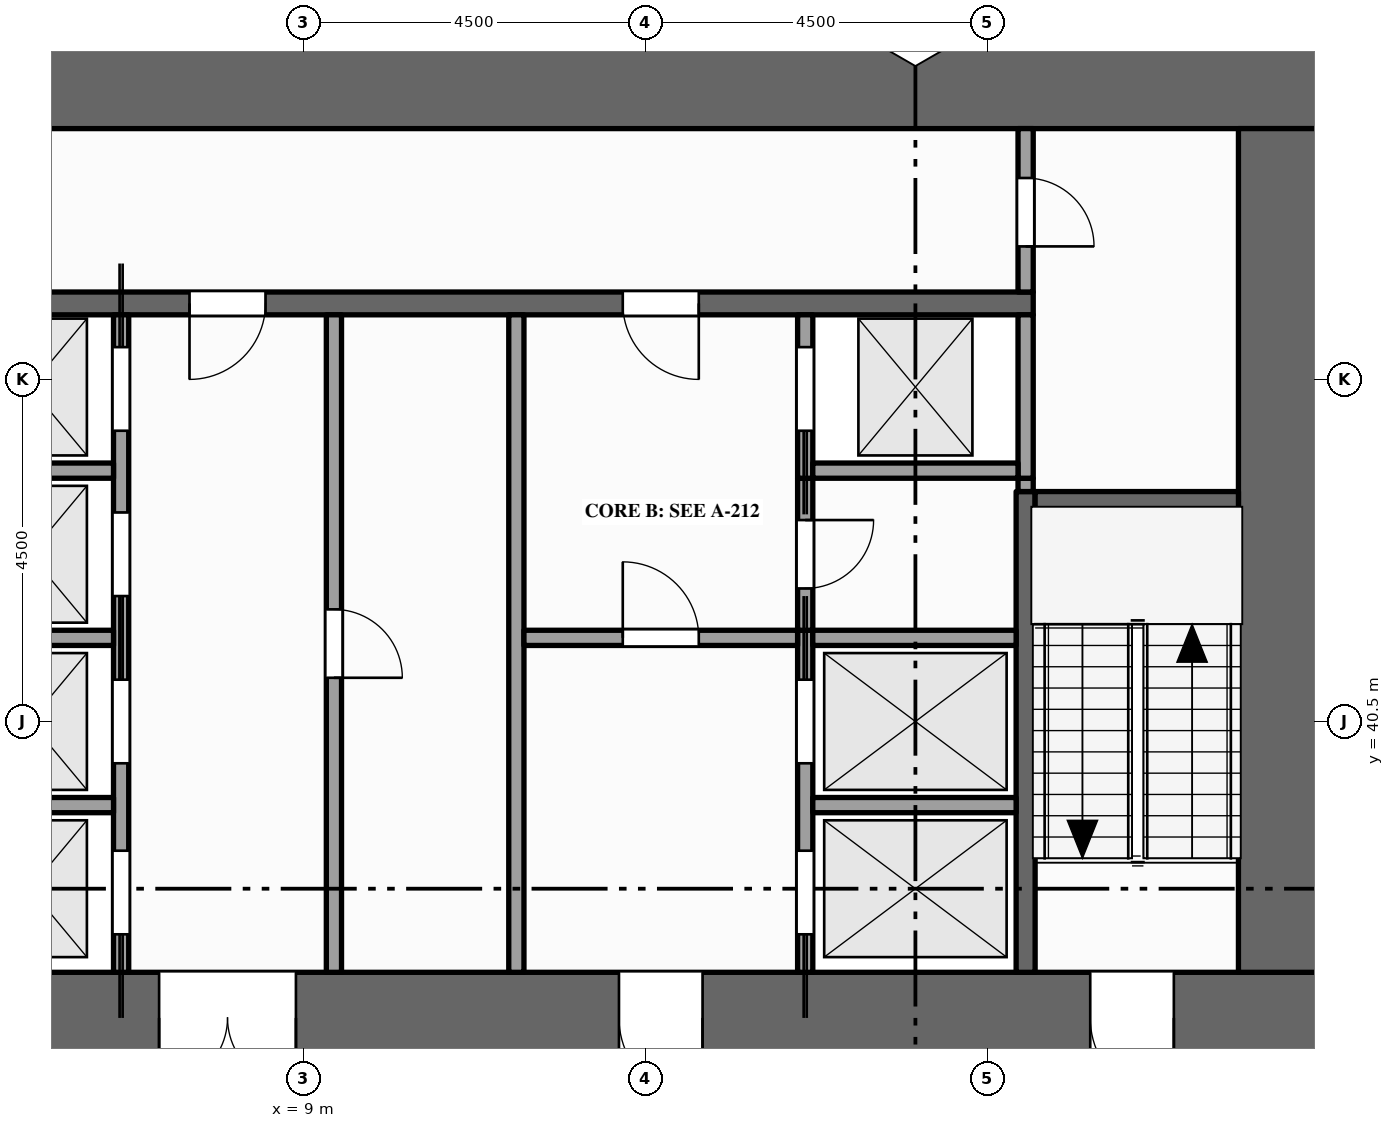
"""IFC4 building model, lengths in metres.
Left out: names, types, materials, properties, quantities, classifications, styles, units other than length and angle.
Written with IfcOpenShell. Run it as: python <this file> out.ifc"""

import sys

from ifc_helpers import new_model, si_unit, direction, frame, frame_2d, origin, place, context, subcontext, project, spatial, rectangle, extrude, element, fill, save


model = new_model("IFC4")
c1 = context("Model", 3, precision=1e-05, world=origin(), true_north=direction((0.0, 1.0)))
c2 = subcontext(c1, "Body", "Model", "MODEL_VIEW")
j1 = project(units=[si_unit("LENGTHUNIT", "METRE"), si_unit("PLANEANGLEUNIT", "RADIAN")], contexts=[c1])
p1 = place(None, origin())
s1 = spatial("IfcSite", under=j1, at=p1, CompositionType="ELEMENT")
p2 = place(p1, origin())
s2 = spatial("IfcBuilding", under=s1, at=p2, CompositionType="ELEMENT")
p3 = place(p2, frame((0.0, 0.0, 61.0)))
s3 = spatial("IfcBuildingStorey", under=s2, at=p3, CompositionType="ELEMENT", Elevation=61.0)
p4 = place(p3, frame((0.0, 36.6, -0.15), z_axis=(0.0, 0.0, 1.0), x_axis=(1.0, 0.0, 0.0)))
e1 = element("IfcWall", 1, at=p4, inside=s3, PredefinedType="SHEAR", context=c2, shape_type="SweptSolid", body=[
    extrude(rectangle(XDim=22.5, YDim=1.2, at=frame_2d((11.25, 0.0))), origin(), (0.0, 0.0, 1.0), 4.0),
])
p5 = place(p4, frame((7.1, 0.0, 0.15)))
e2 = element("IfcOpeningElement", 2, at=p5, cuts=e1, PredefinedType="OPENING", context=c2, shape_type="SweptSolid", body=[
    extrude(rectangle(XDim=1.8, YDim=2.1, at=frame_2d((0.9, 1.05))), frame((0.0, 0.61, 0.0), z_axis=(0.0, -1.0, 0.0), x_axis=(1.0, 0.0, 0.0)), (0.0, 0.0, 1.0), 1.22),
])
p6 = place(p4, frame((13.15, 0.0, 0.15)))
e3 = element("IfcOpeningElement", 3, at=p6, cuts=e1, PredefinedType="OPENING", context=c2, shape_type="SweptSolid", body=[
    extrude(rectangle(XDim=1.1, YDim=2.1, at=frame_2d((0.55, 1.05))), frame((0.0, 0.61, 0.0), z_axis=(0.0, -1.0, 0.0), x_axis=(1.0, 0.0, 0.0)), (0.0, 0.0, 1.0), 1.22),
])
p7 = place(p4, frame((2.15, 0.0, 0.15)))
e4 = element("IfcOpeningElement", 4, at=p7, cuts=e1, PredefinedType="OPENING", context=c2, shape_type="SweptSolid", body=[
    extrude(rectangle(XDim=1.1, YDim=2.1, at=frame_2d((0.55, 1.05))), frame((0.0, 0.61, 0.0), z_axis=(0.0, -1.0, 0.0), x_axis=(1.0, 0.0, 0.0)), (0.0, 0.0, 1.0), 1.22),
])
p8 = place(p4, frame((19.35, 0.0, 0.15)))
e5 = element("IfcOpeningElement", 5, at=p8, cuts=e1, PredefinedType="OPENING", context=c2, shape_type="SweptSolid", body=[
    extrude(rectangle(XDim=1.1, YDim=2.1, at=frame_2d((0.55, 1.05))), frame((0.0, 0.61, 0.0), z_axis=(0.0, -1.0, 0.0), x_axis=(1.0, 0.0, 0.0)), (0.0, 0.0, 1.0), 1.22),
])
p9 = place(p3, frame((0.0, 48.9, -0.15), z_axis=(0.0, 0.0, 1.0), x_axis=(1.0, 0.0, 0.0)))
e6 = element("IfcWall", 6, at=p9, inside=s3, PredefinedType="SHEAR", context=c2, shape_type="SweptSolid", body=[
    extrude(rectangle(XDim=22.5, YDim=1.2, at=frame_2d((11.25, 0.0))), origin(), (0.0, 0.0, 1.0), 4.0),
])
p10 = place(p3, frame((21.9, 37.2, -0.15), z_axis=(0.0, 0.0, 1.0), x_axis=(0.0, 1.0, 0.0)))
e7 = element("IfcWall", 7, at=p10, inside=s3, PredefinedType="SHEAR", context=c2, shape_type="SweptSolid", body=[
    extrude(rectangle(XDim=11.1, YDim=1.2, at=frame_2d((5.55, 0.0))), origin(), (0.0, 0.0, 1.0), 4.0),
])
p11 = place(p3, frame((6.6, 37.2, 0.0), z_axis=(0.0, 0.0, 1.0), x_axis=(0.0, 1.0, 0.0)))
e8 = element("IfcWall", 8, at=p11, inside=s3, PredefinedType="SOLIDWALL", context=c2, shape_type="SweptSolid", body=[
    extrude(rectangle(XDim=8.65, YDim=0.2, at=frame_2d((4.325, 0.0))), origin(), (0.0, 0.0, 1.0), 3.85),
])
p12 = place(p11, frame((0.5, 0.0, 0.012)))
e9 = element("IfcOpeningElement", 9, at=p12, cuts=e8, PredefinedType="OPENING", context=c2, shape_type="SweptSolid", body=[
    extrude(rectangle(XDim=1.1, YDim=2.1, at=frame_2d((0.55, 1.05))), frame((0.0, 0.11, 0.0), z_axis=(0.0, -1.0, 0.0), x_axis=(1.0, 0.0, 0.0)), (0.0, 0.0, 1.0), 0.22),
])
p13 = place(p11, frame((2.75, 0.0, 0.012)))
e10 = element("IfcOpeningElement", 10, at=p13, cuts=e8, PredefinedType="OPENING", context=c2, shape_type="SweptSolid", body=[
    extrude(rectangle(XDim=1.1, YDim=2.1, at=frame_2d((0.55, 1.05))), frame((0.0, 0.11, 0.0), z_axis=(0.0, -1.0, 0.0), x_axis=(1.0, 0.0, 0.0)), (0.0, 0.0, 1.0), 0.22),
])
p14 = place(p11, frame((4.95, 0.0, 0.012)))
e11 = element("IfcOpeningElement", 11, at=p14, cuts=e8, PredefinedType="OPENING", context=c2, shape_type="SweptSolid", body=[
    extrude(rectangle(XDim=1.1, YDim=2.1, at=frame_2d((0.55, 1.05))), frame((0.0, 0.11, 0.0), z_axis=(0.0, -1.0, 0.0), x_axis=(1.0, 0.0, 0.0)), (0.0, 0.0, 1.0), 0.22),
])
p15 = place(p11, frame((7.125, 0.0, 0.012)))
e12 = element("IfcOpeningElement", 12, at=p15, cuts=e8, PredefinedType="OPENING", context=c2, shape_type="SweptSolid", body=[
    extrude(rectangle(XDim=1.1, YDim=2.1, at=frame_2d((0.55, 1.05))), frame((0.0, 0.11, 0.0), z_axis=(0.0, -1.0, 0.0), x_axis=(1.0, 0.0, 0.0)), (0.0, 0.0, 1.0), 0.22),
])
p16 = place(p3, frame((9.4, 37.2, 0.0), z_axis=(0.0, 0.0, 1.0), x_axis=(0.0, 1.0, 0.0)))
e13 = element("IfcWall", 13, at=p16, inside=s3, PredefinedType="PARTITIONING", context=c2, shape_type="SweptSolid", body=[
    extrude(rectangle(XDim=8.65, YDim=0.2, at=frame_2d((4.325, 0.0))), origin(), (0.0, 0.0, 1.0), 3.85),
])
p17 = place(p16, frame((3.875, 0.0, 0.0)))
e14 = element("IfcOpeningElement", 14, at=p17, cuts=e13, PredefinedType="OPENING", context=c2, shape_type="SweptSolid", body=[
    extrude(rectangle(XDim=0.9, YDim=2.1, at=frame_2d((0.45, 1.05))), frame((0.0, 0.11, 0.0), z_axis=(0.0, -1.0, 0.0), x_axis=(1.0, 0.0, 0.0)), (0.0, 0.0, 1.0), 0.22),
])
p18 = place(p3, frame((11.8, 37.2, 0.0), z_axis=(0.0, 0.0, 1.0), x_axis=(0.0, 1.0, 0.0)))
e15 = element("IfcWall", 15, at=p18, inside=s3, PredefinedType="PARTITIONING", context=c2, shape_type="SweptSolid", body=[
    extrude(rectangle(XDim=8.65, YDim=0.2, at=frame_2d((4.325, 0.0))), origin(), (0.0, 0.0, 1.0), 3.85),
])
p19 = place(p3, frame((15.6, 37.2, 0.0), z_axis=(0.0, 0.0, 1.0), x_axis=(0.0, 1.0, 0.0)))
e16 = element("IfcWall", 16, at=p19, inside=s3, PredefinedType="SOLIDWALL", context=c2, shape_type="SweptSolid", body=[
    extrude(rectangle(XDim=4.5, YDim=0.2, at=frame_2d((2.25, 0.0))), origin(), (0.0, 0.0, 1.0), 3.85),
])
p20 = place(p19, frame((0.5, 0.0, 0.012)))
e17 = element("IfcOpeningElement", 17, at=p20, cuts=e16, PredefinedType="OPENING", context=c2, shape_type="SweptSolid", body=[
    extrude(rectangle(XDim=1.1, YDim=2.1, at=frame_2d((0.55, 1.05))), frame((0.0, 0.11, 0.0), z_axis=(0.0, -1.0, 0.0), x_axis=(1.0, 0.0, 0.0)), (0.0, 0.0, 1.0), 0.22),
])
p21 = place(p19, frame((2.75, 0.0, 0.012)))
e18 = element("IfcOpeningElement", 18, at=p21, cuts=e16, PredefinedType="OPENING", context=c2, shape_type="SweptSolid", body=[
    extrude(rectangle(XDim=1.1, YDim=2.1, at=frame_2d((0.55, 1.05))), frame((0.0, 0.11, 0.0), z_axis=(0.0, -1.0, 0.0), x_axis=(1.0, 0.0, 0.0)), (0.0, 0.0, 1.0), 0.22),
])
p22 = place(p3, frame((15.6, 41.7, 0.0), z_axis=(0.0, 0.0, 1.0), x_axis=(0.0, 1.0, 0.0)))
e19 = element("IfcWall", 19, at=p22, inside=s3, PredefinedType="PARTITIONING", context=c2, shape_type="SweptSolid", body=[
    extrude(rectangle(XDim=2.0, YDim=0.2, at=frame_2d((1.0, 0.0))), origin(), (0.0, 0.0, 1.0), 3.85),
])
p23 = place(p22, frame((0.55, 0.0, 0.0)))
e20 = element("IfcOpeningElement", 20, at=p23, cuts=e19, PredefinedType="OPENING", context=c2, shape_type="SweptSolid", body=[
    extrude(rectangle(XDim=0.9, YDim=2.1, at=frame_2d((0.45, 1.05))), frame((0.0, 0.11, 0.0), z_axis=(0.0, -1.0, 0.0), x_axis=(1.0, 0.0, 0.0)), (0.0, 0.0, 1.0), 0.22),
])
p24 = place(p3, frame((15.6, 43.7, 0.0), z_axis=(0.0, 0.0, 1.0), x_axis=(0.0, 1.0, 0.0)))
e21 = element("IfcWall", 21, at=p24, inside=s3, PredefinedType="SOLIDWALL", context=c2, shape_type="SweptSolid", body=[
    extrude(rectangle(XDim=2.15, YDim=0.2, at=frame_2d((1.075, 0.0))), origin(), (0.0, 0.0, 1.0), 3.85),
])
p25 = place(p24, frame((0.625, 0.0, 0.012)))
e22 = element("IfcOpeningElement", 22, at=p25, cuts=e21, PredefinedType="OPENING", context=c2, shape_type="SweptSolid", body=[
    extrude(rectangle(XDim=1.1, YDim=2.1, at=frame_2d((0.55, 1.05))), frame((0.0, 0.11, 0.0), z_axis=(0.0, -1.0, 0.0), x_axis=(1.0, 0.0, 0.0)), (0.0, 0.0, 1.0), 0.22),
])
p26 = place(p3, frame((18.5, 37.2, 0.0), z_axis=(0.0, 0.0, 1.0), x_axis=(0.0, 1.0, 0.0)))
e23 = element("IfcWall", 23, at=p26, inside=s3, PredefinedType="SHEAR", context=c2, shape_type="SweptSolid", body=[
    extrude(rectangle(XDim=6.325, YDim=0.25, at=frame_2d((3.163, 0.0))), origin(), (0.0, 0.0, 1.0), 3.85),
])
p27 = place(p3, frame((18.5, 43.525, 0.0), z_axis=(0.0, 0.0, 1.0), x_axis=(0.0, 1.0, 0.0)))
e24 = element("IfcWall", 24, at=p27, inside=s3, PredefinedType="PARTITIONING", context=c2, shape_type="SweptSolid", body=[
    extrude(rectangle(XDim=0.175, YDim=0.2, at=frame_2d((0.087, 0.0))), origin(), (0.0, 0.0, 1.0), 3.85),
])
p28 = place(p3, frame((18.5, 43.7, 0.0), z_axis=(0.0, 0.0, 1.0), x_axis=(0.0, 1.0, 0.0)))
e25 = element("IfcWall", 25, at=p28, inside=s3, PredefinedType="SOLIDWALL", context=c2, shape_type="SweptSolid", body=[
    extrude(rectangle(XDim=2.15, YDim=0.2, at=frame_2d((1.075, 0.0))), origin(), (0.0, 0.0, 1.0), 3.85),
])
p29 = place(p3, frame((18.5, 46.15, 0.0), z_axis=(0.0, 0.0, 1.0), x_axis=(0.0, 1.0, 0.0)))
e26 = element("IfcWall", 26, at=p29, inside=s3, PredefinedType="PARTITIONING", context=c2, shape_type="SweptSolid", body=[
    extrude(rectangle(XDim=2.15, YDim=0.2, at=frame_2d((1.075, 0.0))), origin(), (0.0, 0.0, 1.0), 3.85),
])
p30 = place(p29, frame((0.6, 0.0, 0.0)))
e27 = element("IfcOpeningElement", 27, at=p30, cuts=e26, PredefinedType="OPENING", context=c2, shape_type="SweptSolid", body=[
    extrude(rectangle(XDim=0.9, YDim=2.1, at=frame_2d((0.45, 1.05))), frame((0.0, 0.11, 0.0), z_axis=(0.0, -1.0, 0.0), x_axis=(1.0, 0.0, 0.0)), (0.0, 0.0, 1.0), 0.22),
])
p31 = place(p3, frame((4.325, 39.4, 0.0), z_axis=(0.0, 0.0, 1.0), x_axis=(1.0, 0.0, 0.0)))
e28 = element("IfcWall", 28, at=p31, inside=s3, PredefinedType="SOLIDWALL", context=c2, shape_type="SweptSolid", body=[
    extrude(rectangle(XDim=2.175, YDim=0.2, at=frame_2d((1.087, 0.0))), origin(), (0.0, 0.0, 1.0), 3.85),
])
p32 = place(p3, frame((15.7, 39.4, 0.0), z_axis=(0.0, 0.0, 1.0), x_axis=(1.0, 0.0, 0.0)))
e29 = element("IfcWall", 29, at=p32, inside=s3, PredefinedType="SOLIDWALL", context=c2, shape_type="SweptSolid", body=[
    extrude(rectangle(XDim=2.675, YDim=0.2, at=frame_2d((1.337, 0.0))), origin(), (0.0, 0.0, 1.0), 3.85),
])
p33 = place(p3, frame((4.325, 41.6, 0.0), z_axis=(0.0, 0.0, 1.0), x_axis=(1.0, 0.0, 0.0)))
e30 = element("IfcWall", 30, at=p33, inside=s3, PredefinedType="SOLIDWALL", context=c2, shape_type="SweptSolid", body=[
    extrude(rectangle(XDim=2.175, YDim=0.2, at=frame_2d((1.087, 0.0))), origin(), (0.0, 0.0, 1.0), 3.85),
])
p34 = place(p3, frame((11.9, 41.6, 0.0), z_axis=(0.0, 0.0, 1.0), x_axis=(1.0, 0.0, 0.0)))
e31 = element("IfcWall", 31, at=p34, inside=s3, PredefinedType="PARTITIONING", context=c2, shape_type="SweptSolid", body=[
    extrude(rectangle(XDim=3.6, YDim=0.2, at=frame_2d((1.8, 0.0))), origin(), (0.0, 0.0, 1.0), 3.85),
])
p35 = place(p34, frame((1.3, 0.0, 0.0)))
e32 = element("IfcOpeningElement", 32, at=p35, cuts=e31, PredefinedType="OPENING", context=c2, shape_type="SweptSolid", body=[
    extrude(rectangle(XDim=1.0, YDim=2.1, at=frame_2d((0.5, 1.05))), frame((0.0, 0.11, 0.0), z_axis=(0.0, -1.0, 0.0), x_axis=(1.0, 0.0, 0.0)), (0.0, 0.0, 1.0), 0.22),
])
p36 = place(p3, frame((15.7, 41.6, 0.0), z_axis=(0.0, 0.0, 1.0), x_axis=(1.0, 0.0, 0.0)))
e33 = element("IfcWall", 33, at=p36, inside=s3, PredefinedType="SOLIDWALL", context=c2, shape_type="SweptSolid", body=[
    extrude(rectangle(XDim=2.675, YDim=0.2, at=frame_2d((1.337, 0.0))), origin(), (0.0, 0.0, 1.0), 3.85),
])
p37 = place(p3, frame((18.625, 43.4, 0.0), z_axis=(0.0, 0.0, 1.0), x_axis=(1.0, 0.0, 0.0)))
e34 = element("IfcWall", 34, at=p37, inside=s3, PredefinedType="SHEAR", context=c2, shape_type="SweptSolid", body=[
    extrude(rectangle(XDim=2.675, YDim=0.25, at=frame_2d((1.337, 0.0))), origin(), (0.0, 0.0, 1.0), 3.85),
])
p38 = place(p3, frame((4.3, 43.8, 0.0), z_axis=(0.0, 0.0, 1.0), x_axis=(1.0, 0.0, 0.0)))
e35 = element("IfcWall", 35, at=p38, inside=s3, PredefinedType="SOLIDWALL", context=c2, shape_type="SweptSolid", body=[
    extrude(rectangle(XDim=2.2, YDim=0.2, at=frame_2d((1.1, 0.0))), origin(), (0.0, 0.0, 1.0), 3.85),
])
p39 = place(p3, frame((15.7, 43.8, 0.0), z_axis=(0.0, 0.0, 1.0), x_axis=(1.0, 0.0, 0.0)))
e36 = element("IfcWall", 36, at=p39, inside=s3, PredefinedType="SOLIDWALL", context=c2, shape_type="SweptSolid", body=[
    extrude(rectangle(XDim=2.7, YDim=0.2, at=frame_2d((1.35, 0.0))), origin(), (0.0, 0.0, 1.0), 3.85),
])
p40 = place(p3, frame((4.1, 46.0, 0.0), z_axis=(0.0, 0.0, 1.0), x_axis=(1.0, 0.0, 0.0)))
e37 = element("IfcWall", 37, at=p40, inside=s3, PredefinedType="SHEAR", context=c2, shape_type="SweptSolid", body=[
    extrude(rectangle(XDim=14.5, YDim=0.3, at=frame_2d((7.25, 0.0))), origin(), (0.0, 0.0, 1.0), 3.85),
])
p41 = place(p40, frame((3.4, 0.0, 0.0)))
e38 = element("IfcOpeningElement", 38, at=p41, cuts=e37, PredefinedType="OPENING", context=c2, shape_type="SweptSolid", body=[
    extrude(rectangle(XDim=1.0, YDim=2.1, at=frame_2d((0.5, 1.05))), frame((0.0, 0.16, 0.0), z_axis=(0.0, -1.0, 0.0), x_axis=(1.0, 0.0, 0.0)), (0.0, 0.0, 1.0), 0.32),
])
p42 = place(p40, frame((9.1, 0.0, 0.0)))
e39 = element("IfcOpeningElement", 39, at=p42, cuts=e37, PredefinedType="OPENING", context=c2, shape_type="SweptSolid", body=[
    extrude(rectangle(XDim=1.0, YDim=2.1, at=frame_2d((0.5, 1.05))), frame((0.0, 0.16, 0.0), z_axis=(0.0, -1.0, 0.0), x_axis=(1.0, 0.0, 0.0)), (0.0, 0.0, 1.0), 0.32),
])
p43 = place(p12, origin())
e40 = element("IfcDoor", 40, at=p43, inside=s3, OperationType="SLIDING_TO_LEFT", PredefinedType="DOOR", context=c2, shape_type="SweptSolid", body=[
    extrude(rectangle(XDim=1.1, YDim=2.1, at=frame_2d((0.55, 1.05))), frame((0.0, 0.025, 0.0), z_axis=(0.0, -1.0, 0.0), x_axis=(1.0, 0.0, 0.0)), (0.0, 0.0, 1.0), 0.05),
])
fill(e9, e40)
p44 = place(p13, origin())
e41 = element("IfcDoor", 41, at=p44, inside=s3, OperationType="SLIDING_TO_RIGHT", PredefinedType="DOOR", context=c2, shape_type="SweptSolid", body=[
    extrude(rectangle(XDim=1.1, YDim=2.1, at=frame_2d((0.55, 1.05))), frame((0.0, 0.025, 0.0), z_axis=(0.0, -1.0, 0.0), x_axis=(1.0, 0.0, 0.0)), (0.0, 0.0, 1.0), 0.05),
])
fill(e10, e41)
p45 = place(p14, origin())
e42 = element("IfcDoor", 42, at=p45, inside=s3, OperationType="SLIDING_TO_LEFT", PredefinedType="DOOR", context=c2, shape_type="SweptSolid", body=[
    extrude(rectangle(XDim=1.1, YDim=2.1, at=frame_2d((0.55, 1.05))), frame((0.0, 0.025, 0.0), z_axis=(0.0, -1.0, 0.0), x_axis=(1.0, 0.0, 0.0)), (0.0, 0.0, 1.0), 0.05),
])
fill(e11, e42)
p46 = place(p15, origin())
e43 = element("IfcDoor", 43, at=p46, inside=s3, OperationType="SLIDING_TO_RIGHT", PredefinedType="DOOR", context=c2, shape_type="SweptSolid", body=[
    extrude(rectangle(XDim=1.1, YDim=2.1, at=frame_2d((0.55, 1.05))), frame((0.0, 0.025, 0.0), z_axis=(0.0, -1.0, 0.0), x_axis=(1.0, 0.0, 0.0)), (0.0, 0.0, 1.0), 0.05),
])
fill(e12, e43)
p47 = place(p20, origin())
e44 = element("IfcDoor", 44, at=p47, inside=s3, OperationType="SLIDING_TO_LEFT", PredefinedType="DOOR", context=c2, shape_type="SweptSolid", body=[
    extrude(rectangle(XDim=1.1, YDim=2.1, at=frame_2d((0.55, 1.05))), frame((0.0, 0.025, 0.0), z_axis=(0.0, -1.0, 0.0), x_axis=(1.0, 0.0, 0.0)), (0.0, 0.0, 1.0), 0.05),
])
fill(e17, e44)
p48 = place(p21, origin())
e45 = element("IfcDoor", 45, at=p48, inside=s3, OperationType="SLIDING_TO_RIGHT", PredefinedType="DOOR", context=c2, shape_type="SweptSolid", body=[
    extrude(rectangle(XDim=1.1, YDim=2.1, at=frame_2d((0.55, 1.05))), frame((0.0, 0.025, 0.0), z_axis=(0.0, -1.0, 0.0), x_axis=(1.0, 0.0, 0.0)), (0.0, 0.0, 1.0), 0.05),
])
fill(e18, e45)
p49 = place(p25, origin())
e46 = element("IfcDoor", 46, at=p49, inside=s3, OperationType="SLIDING_TO_LEFT", PredefinedType="DOOR", context=c2, shape_type="SweptSolid", body=[
    extrude(rectangle(XDim=1.1, YDim=2.1, at=frame_2d((0.55, 1.05))), frame((0.0, 0.025, 0.0), z_axis=(0.0, -1.0, 0.0), x_axis=(1.0, 0.0, 0.0)), (0.0, 0.0, 1.0), 0.05),
])
fill(e22, e46)
p50 = place(p5, origin())
e47 = element("IfcDoor", 47, at=p50, inside=s3, OperationType="DOUBLE_DOOR_SINGLE_SWING", PredefinedType="DOOR", context=c2, shape_type="SweptSolid", body=[
    extrude(rectangle(XDim=1.8, YDim=2.1, at=frame_2d((0.9, 1.05))), frame((0.0, 0.025, 0.0), z_axis=(0.0, -1.0, 0.0), x_axis=(1.0, 0.0, 0.0)), (0.0, 0.0, 1.0), 0.05),
])
fill(e2, e47)
p51 = place(p41, origin())
e48 = element("IfcDoor", 48, at=p51, inside=s3, OperationType="SINGLE_SWING_LEFT", PredefinedType="DOOR", context=c2, shape_type="SweptSolid", body=[
    extrude(rectangle(XDim=1.0, YDim=2.1, at=frame_2d((0.5, 1.05))), frame((0.0, 0.025, 0.0), z_axis=(0.0, -1.0, 0.0), x_axis=(1.0, 0.0, 0.0)), (0.0, 0.0, 1.0), 0.05),
])
fill(e38, e48)
p52 = place(p6, origin())
e49 = element("IfcDoor", 49, at=p52, inside=s3, OperationType="SINGLE_SWING_RIGHT", PredefinedType="DOOR", context=c2, shape_type="SweptSolid", body=[
    extrude(rectangle(XDim=1.1, YDim=2.1, at=frame_2d((0.55, 1.05))), frame((0.0, 0.025, 0.0), z_axis=(0.0, -1.0, 0.0), x_axis=(1.0, 0.0, 0.0)), (0.0, 0.0, 1.0), 0.05),
])
fill(e3, e49)
p53 = place(p35, origin())
e50 = element("IfcDoor", 50, at=p53, inside=s3, OperationType="SINGLE_SWING_LEFT", PredefinedType="DOOR", context=c2, shape_type="SweptSolid", body=[
    extrude(rectangle(XDim=1.0, YDim=2.1, at=frame_2d((0.5, 1.05))), frame((0.0, 0.025, 0.0), z_axis=(0.0, -1.0, 0.0), x_axis=(1.0, 0.0, 0.0)), (0.0, 0.0, 1.0), 0.05),
])
fill(e32, e50)
p54 = place(p42, origin())
e51 = element("IfcDoor", 51, at=p54, inside=s3, OperationType="SINGLE_SWING_RIGHT", PredefinedType="DOOR", context=c2, shape_type="SweptSolid", body=[
    extrude(rectangle(XDim=1.0, YDim=2.1, at=frame_2d((0.5, 1.05))), frame((0.0, 0.025, 0.0), z_axis=(0.0, -1.0, 0.0), x_axis=(1.0, 0.0, 0.0)), (0.0, 0.0, 1.0), 0.05),
])
fill(e39, e51)
p55 = place(p8, origin())
e52 = element("IfcDoor", 52, at=p55, inside=s3, OperationType="SINGLE_SWING_RIGHT", PredefinedType="DOOR", context=c2, shape_type="SweptSolid", body=[
    extrude(rectangle(XDim=1.1, YDim=2.1, at=frame_2d((0.55, 1.05))), frame((0.0, 0.025, 0.0), z_axis=(0.0, -1.0, 0.0), x_axis=(1.0, 0.0, 0.0)), (0.0, 0.0, 1.0), 0.05),
])
fill(e5, e52)
p56 = place(p30, origin())
e53 = element("IfcDoor", 53, at=p56, inside=s3, OperationType="SINGLE_SWING_LEFT", PredefinedType="DOOR", context=c2, shape_type="SweptSolid", body=[
    extrude(rectangle(XDim=0.9, YDim=2.1, at=frame_2d((0.45, 1.05))), frame((0.0, 0.025, 0.0), z_axis=(0.0, -1.0, 0.0), x_axis=(1.0, 0.0, 0.0)), (0.0, 0.0, 1.0), 0.05),
])
fill(e27, e53)
p57 = place(p17, origin())
e54 = element("IfcDoor", 54, at=p57, inside=s3, OperationType="SINGLE_SWING_LEFT", PredefinedType="DOOR", context=c2, shape_type="SweptSolid", body=[
    extrude(rectangle(XDim=0.9, YDim=2.1, at=frame_2d((0.45, 1.05))), frame((0.0, 0.025, 0.0), z_axis=(0.0, -1.0, 0.0), x_axis=(1.0, 0.0, 0.0)), (0.0, 0.0, 1.0), 0.05),
])
fill(e14, e54)
p58 = place(p23, origin())
e55 = element("IfcDoor", 55, at=p58, inside=s3, OperationType="SINGLE_SWING_RIGHT", PredefinedType="DOOR", context=c2, shape_type="SweptSolid", body=[
    extrude(rectangle(XDim=0.9, YDim=2.1, at=frame_2d((0.45, 1.05))), frame((0.0, 0.025, 0.0), z_axis=(0.0, -1.0, 0.0), x_axis=(1.0, 0.0, 0.0)), (0.0, 0.0, 1.0), 0.05),
])
fill(e20, e55)
save(model, sys.argv[1])
